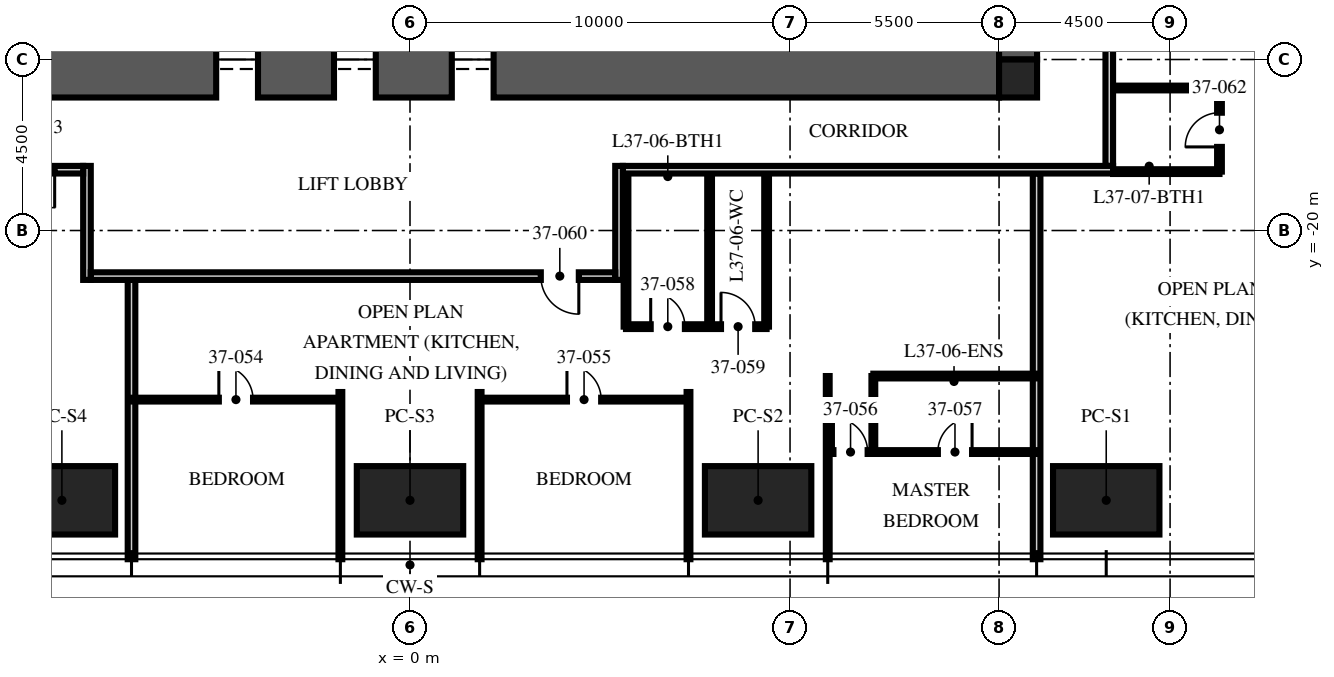
"""IFC4 building model, lengths in metres.
Left out: names, types, materials, properties, quantities, classifications, styles, units other than length and angle.
Written with IfcOpenShell. Run it as: python <this file> out.ifc"""

import sys

from ifc_helpers import new_model, si_unit, direction, frame, frame_2d, origin, origin_2d, place, context, subcontext, project, spatial, rectangle, extrude, element, fill, save


model = new_model("IFC4")
c1 = context("Model", 3, precision=1e-05, world=origin(), true_north=direction((0.0, 1.0)))
c2 = subcontext(c1, "Body", "Model", "MODEL_VIEW")
j1 = project(units=[si_unit("LENGTHUNIT", "METRE"), si_unit("PLANEANGLEUNIT", "RADIAN")], contexts=[c1])
p1 = place(None, origin())
s1 = spatial("IfcSite", under=j1, at=p1, CompositionType="ELEMENT")
p2 = place(p1, origin())
s2 = spatial("IfcBuilding", under=s1, at=p2, CompositionType="ELEMENT")
p3 = place(p2, frame((0.0, 0.0, 148.5)))
s3 = spatial("IfcBuildingStorey", under=s2, at=p3, CompositionType="ELEMENT", Elevation=148.5)
p4 = place(p3, frame((15.5, -15.5, -0.25), z_axis=(0.0, 0.0, 1.0), x_axis=(0.0, 1.0, 0.0)))
e1 = element("IfcWall", 1, at=p4, inside=s3, PredefinedType="SHEAR", context=c2, shape_type="SweptSolid", body=[
    extrude(rectangle(XDim=31.0, YDim=2.0, at=frame_2d((15.5, 0.0))), origin(), (0.0, 0.0, 1.0), 3.75),
])
p5 = place(p4, frame((6.5, 0.0, 0.25)))
e2 = element("IfcOpeningElement", 2, at=p5, cuts=e1, PredefinedType="OPENING", context=c2, shape_type="SweptSolid", body=[
    extrude(rectangle(XDim=1.2, YDim=2.1, at=frame_2d((0.6, 1.05))), frame((0.0, 1.01, 0.0), z_axis=(0.0, -1.0, 0.0), x_axis=(1.0, 0.0, 0.0)), (0.0, 0.0, 1.0), 2.02),
])
p6 = place(p4, frame((23.0, 0.0, 0.25)))
e3 = element("IfcOpeningElement", 3, at=p6, cuts=e1, PredefinedType="OPENING", context=c2, shape_type="SweptSolid", body=[
    extrude(rectangle(XDim=1.8, YDim=2.1, at=frame_2d((0.9, 1.05))), frame((0.0, 1.01, 0.0), z_axis=(0.0, -1.0, 0.0), x_axis=(1.0, 0.0, 0.0)), (0.0, 0.0, 1.0), 2.02),
])
p7 = place(p3, frame((-15.5, -15.5, -0.25), z_axis=(0.0, 0.0, 1.0), x_axis=(1.0, 0.0, 0.0)))
e4 = element("IfcWall", 4, at=p7, inside=s3, PredefinedType="SHEAR", context=c2, shape_type="SweptSolid", body=[
    extrude(rectangle(XDim=31.0, YDim=2.0, at=frame_2d((15.5, 0.0))), origin(), (0.0, 0.0, 1.0), 3.75),
])
p8 = place(p7, frame((10.4, 0.0, 0.25)))
e5 = element("IfcOpeningElement", 5, at=p8, cuts=e4, PredefinedType="OPENING", context=c2, shape_type="SweptSolid", body=[
    extrude(rectangle(XDim=1.1, YDim=2.1, at=frame_2d((0.55, 1.05))), frame((0.0, 1.01, 0.0), z_axis=(0.0, -1.0, 0.0), x_axis=(1.0, 0.0, 0.0)), (0.0, 0.0, 1.0), 2.02),
])
p9 = place(p7, frame((13.5, 0.0, 0.25)))
e6 = element("IfcOpeningElement", 6, at=p9, cuts=e4, PredefinedType="OPENING", context=c2, shape_type="SweptSolid", body=[
    extrude(rectangle(XDim=1.1, YDim=2.1, at=frame_2d((0.55, 1.05))), frame((0.0, 1.01, 0.0), z_axis=(0.0, -1.0, 0.0), x_axis=(1.0, 0.0, 0.0)), (0.0, 0.0, 1.0), 2.02),
])
p10 = place(p7, frame((16.6, 0.0, 0.25)))
e7 = element("IfcOpeningElement", 7, at=p10, cuts=e4, PredefinedType="OPENING", context=c2, shape_type="SweptSolid", body=[
    extrude(rectangle(XDim=1.1, YDim=2.1, at=frame_2d((0.55, 1.05))), frame((0.0, 1.01, 0.0), z_axis=(0.0, -1.0, 0.0), x_axis=(1.0, 0.0, 0.0)), (0.0, 0.0, 1.0), 2.02),
])
p11 = place(p3, frame((16.0, -16.0, -0.25), z_axis=(0.0, 0.0, 1.0), x_axis=(1.0, 0.0, 0.0)))
e8 = element("IfcColumn", 8, at=p11, inside=s3, PredefinedType="COLUMN", context=c2, shape_type="SweptSolid", body=[
    extrude(rectangle(XDim=1.0, YDim=1.0, at=origin_2d()), origin(), (0.0, 0.0, 1.0), 3.75),
])
for number, where, z_axis, x_axis in (
    (9, (18.32, -27.1, 0.0), (0.0, 0.0, 1.0), (1.0, 0.0, 0.0)),
    (10, (9.16, -27.1, 0.0), (0.0, 0.0, 1.0), (1.0, 0.0, 0.0)),
    (11, (0.0, -27.1, 0.0), (0.0, 0.0, 1.0), (1.0, 0.0, 0.0)),
    (12, (-9.16, -27.1, 0.0), (0.0, 0.0, 1.0), (1.0, 0.0, 0.0)),
):
    element("IfcColumn", number, at=place(p3, frame(where, z_axis=z_axis, x_axis=x_axis)), inside=s3, PredefinedType="COLUMN", context=c2, shape_type="SweptSolid", body=[
        extrude(rectangle(XDim=2.8, YDim=1.8, at=origin_2d()), origin(), (0.0, 0.0, 1.0), 3.75),
    ])
p12 = place(p3, frame((-7.328, -21.3, 0.0), z_axis=(0.0, 0.0, 1.0), x_axis=(0.0, -1.0, 0.0)))
e13 = element("IfcWall", 13, at=p12, inside=s3, PredefinedType="PARTITIONING", context=c2, shape_type="SweptSolid", body=[
    extrude(rectangle(XDim=7.35, YDim=0.2, at=frame_2d((3.675, 0.0))), origin(), (0.0, 0.0, 1.0), 2.81),
])
for number, where, z_axis, x_axis in (
    (14, (-1.832, -24.25, 0.0), (0.0, 0.0, 1.0), (0.0, -1.0, 0.0)),
    (15, (1.832, -24.25, 0.0), (0.0, 0.0, 1.0), (0.0, -1.0, 0.0)),
    (16, (7.328, -24.25, 0.0), (0.0, 0.0, 1.0), (0.0, -1.0, 0.0)),
):
    element("IfcWall", number, at=place(p3, frame(where, z_axis=z_axis, x_axis=x_axis)), inside=s3, PredefinedType="PARTITIONING", context=c2, shape_type="SweptSolid", body=[
        extrude(rectangle(XDim=4.4, YDim=0.1, at=frame_2d((2.2, 0.0))), origin(), (0.0, 0.0, 1.0), 2.81),
    ])
p13 = place(p3, frame((10.992, -23.83, 0.0), z_axis=(0.0, 0.0, 1.0), x_axis=(0.0, -1.0, 0.0)))
e17 = element("IfcWall", 17, at=p13, inside=s3, PredefinedType="PARTITIONING", context=c2, shape_type="SweptSolid", body=[
    extrude(rectangle(XDim=4.82, YDim=0.1, at=frame_2d((2.41, 0.0))), origin(), (0.0, 0.0, 1.0), 2.81),
])
p14 = place(p3, frame((16.488, -18.5, 0.0), z_axis=(0.0, 0.0, 1.0), x_axis=(0.0, -1.0, 0.0)))
e18 = element("IfcWall", 18, at=p14, inside=s3, PredefinedType="PARTITIONING", context=c2, shape_type="SweptSolid", body=[
    extrude(rectangle(XDim=10.15, YDim=0.2, at=frame_2d((5.075, 0.0))), origin(), (0.0, 0.0, 1.0), 2.81),
])
p15 = place(p3, frame((-7.328, -24.45, 0.0), z_axis=(0.0, 0.0, 1.0), x_axis=(1.0, 0.0, 0.0)))
e19 = element("IfcWall", 19, at=p15, inside=s3, PredefinedType="PARTITIONING", context=c2, shape_type="SweptSolid", body=[
    extrude(rectangle(XDim=5.496, YDim=0.1, at=frame_2d((2.748, 0.0))), origin(), (0.0, 0.0, 1.0), 2.81),
])
p16 = place(p15, frame((2.298, 0.0, 0.0)))
e20 = element("IfcOpeningElement", 20, at=p16, cuts=e19, PredefinedType="OPENING", context=c2, shape_type="SweptSolid", body=[
    extrude(rectangle(XDim=0.9, YDim=2.1, at=frame_2d((0.45, 1.05))), frame((0.0, 0.06, 0.0), z_axis=(0.0, -1.0, 0.0), x_axis=(1.0, 0.0, 0.0)), (0.0, 0.0, 1.0), 0.12),
])
p17 = place(p3, frame((1.832, -24.45, 0.0), z_axis=(0.0, 0.0, 1.0), x_axis=(1.0, 0.0, 0.0)))
e21 = element("IfcWall", 21, at=p17, inside=s3, PredefinedType="PARTITIONING", context=c2, shape_type="SweptSolid", body=[
    extrude(rectangle(XDim=5.496, YDim=0.1, at=frame_2d((2.748, 0.0))), origin(), (0.0, 0.0, 1.0), 2.81),
])
p18 = place(p17, frame((2.298, 0.0, 0.0)))
e22 = element("IfcOpeningElement", 22, at=p18, cuts=e21, PredefinedType="OPENING", context=c2, shape_type="SweptSolid", body=[
    extrude(rectangle(XDim=0.9, YDim=2.1, at=frame_2d((0.45, 1.05))), frame((0.0, 0.06, 0.0), z_axis=(0.0, -1.0, 0.0), x_axis=(1.0, 0.0, 0.0)), (0.0, 0.0, 1.0), 0.12),
])
p19 = place(p3, frame((10.992, -25.83, 0.0), z_axis=(0.0, 0.0, 1.0), x_axis=(1.0, 0.0, 0.0)))
e23 = element("IfcWall", 23, at=p19, inside=s3, PredefinedType="PARTITIONING", context=c2, shape_type="SweptSolid", body=[
    extrude(rectangle(XDim=5.496, YDim=0.1, at=frame_2d((2.748, 0.0))), origin(), (0.0, 0.0, 1.0), 2.81),
])
p20 = place(p19, frame((0.15, 0.0, 0.0)))
e24 = element("IfcOpeningElement", 24, at=p20, cuts=e23, PredefinedType="OPENING", context=c2, shape_type="SweptSolid", body=[
    extrude(rectangle(XDim=0.9, YDim=2.1, at=frame_2d((0.45, 1.05))), frame((0.0, 0.06, 0.0), z_axis=(0.0, -1.0, 0.0), x_axis=(1.0, 0.0, 0.0)), (0.0, 0.0, 1.0), 0.12),
])
p21 = place(p19, frame((2.898, 0.0, 0.0)))
e25 = element("IfcOpeningElement", 25, at=p21, cuts=e23, PredefinedType="OPENING", context=c2, shape_type="SweptSolid", body=[
    extrude(rectangle(XDim=0.9, YDim=2.1, at=frame_2d((0.45, 1.05))), frame((0.0, 0.06, 0.0), z_axis=(0.0, -1.0, 0.0), x_axis=(1.0, 0.0, 0.0)), (0.0, 0.0, 1.0), 0.12),
])
p22 = place(p3, frame((12.192, -23.83, 0.0), z_axis=(0.0, 0.0, 1.0), x_axis=(0.0, -1.0, 0.0)))
e26 = element("IfcWall", 26, at=p22, inside=s3, PredefinedType="PARTITIONING", context=c2, shape_type="SweptSolid", body=[
    extrude(rectangle(XDim=2.0, YDim=0.1, at=frame_2d((1.0, 0.0))), origin(), (0.0, 0.0, 1.0), 3.5),
])
p23 = place(p3, frame((12.192, -23.83, 0.0), z_axis=(0.0, 0.0, 1.0), x_axis=(1.0, 0.0, 0.0)))
e27 = element("IfcWall", 27, at=p23, inside=s3, PredefinedType="PARTITIONING", context=c2, shape_type="SweptSolid", body=[
    extrude(rectangle(XDim=4.296, YDim=0.125, at=frame_2d((2.148, 0.0))), origin(), (0.0, 0.0, 1.0), 2.81),
])
p24 = place(p3, frame((5.684, -22.53, 0.0), z_axis=(0.0, 0.0, 1.0), x_axis=(1.0, 0.0, 0.0)))
e28 = element("IfcWall", 28, at=p24, inside=s3, PredefinedType="PARTITIONING", context=c2, shape_type="SweptSolid", body=[
    extrude(rectangle(XDim=3.7, YDim=0.125, at=frame_2d((1.85, 0.0))), origin(), (0.0, 0.0, 1.0), 2.7),
])
p25 = place(p24, frame((0.65, 0.0, 0.0)))
e29 = element("IfcOpeningElement", 29, at=p25, cuts=e28, PredefinedType="OPENING", context=c2, shape_type="SweptSolid", body=[
    extrude(rectangle(XDim=0.9, YDim=2.1, at=frame_2d((0.45, 1.05))), frame((0.0, 0.073, 0.0), z_axis=(0.0, -1.0, 0.0), x_axis=(1.0, 0.0, 0.0)), (0.0, 0.0, 1.0), 0.145),
])
p26 = place(p24, frame((2.5, 0.0, 0.0)))
e30 = element("IfcOpeningElement", 30, at=p26, cuts=e28, PredefinedType="OPENING", context=c2, shape_type="SweptSolid", body=[
    extrude(rectangle(XDim=0.9, YDim=2.1, at=frame_2d((0.45, 1.05))), frame((0.0, 0.073, 0.0), z_axis=(0.0, -1.0, 0.0), x_axis=(1.0, 0.0, 0.0)), (0.0, 0.0, 1.0), 0.145),
])
for number, where, z_axis, x_axis in (
    (31, (5.684, -18.5, 0.0), (0.0, 0.0, 1.0), (0.0, -1.0, 0.0)),
    (32, (7.884, -18.5, 0.0), (0.0, 0.0, 1.0), (0.0, -1.0, 0.0)),
    (33, (9.384, -18.5, 0.0), (0.0, 0.0, 1.0), (0.0, -1.0, 0.0)),
):
    element("IfcWall", number, at=place(p3, frame(where, z_axis=z_axis, x_axis=x_axis)), inside=s3, PredefinedType="PARTITIONING", context=c2, shape_type="SweptSolid", body=[
        extrude(rectangle(XDim=4.03, YDim=0.125, at=frame_2d((2.015, 0.0))), origin(), (0.0, 0.0, 1.0), 3.5),
    ])
p27 = place(p3, frame((21.3, -18.45, 0.0), z_axis=(0.0, 0.0, 1.0), x_axis=(0.0, 1.0, 0.0)))
e34 = element("IfcWall", 34, at=p27, inside=s3, PredefinedType="PARTITIONING", context=c2, shape_type="SweptSolid", body=[
    extrude(rectangle(XDim=2.2, YDim=0.125, at=frame_2d((1.1, 0.0))), origin(), (0.0, 0.0, 1.0), 2.7),
])
p28 = place(p27, frame((0.65, 0.0, 0.0)))
e35 = element("IfcOpeningElement", 35, at=p28, cuts=e34, PredefinedType="OPENING", context=c2, shape_type="SweptSolid", body=[
    extrude(rectangle(XDim=0.9, YDim=2.1, at=frame_2d((0.45, 1.05))), frame((0.0, 0.073, 0.0), z_axis=(0.0, -1.0, 0.0), x_axis=(1.0, 0.0, 0.0)), (0.0, 0.0, 1.0), 0.145),
])
p29 = place(p3, frame((18.5, -18.45, 0.0), z_axis=(0.0, 0.0, 1.0), x_axis=(1.0, 0.0, 0.0)))
e36 = element("IfcWall", 36, at=p29, inside=s3, PredefinedType="PARTITIONING", context=c2, shape_type="SweptSolid", body=[
    extrude(rectangle(XDim=2.8, YDim=0.125, at=frame_2d((1.4, 0.0))), origin(), (0.0, 0.0, 1.0), 2.3),
])
p30 = place(p3, frame((18.5, -16.25, 0.0), z_axis=(0.0, 0.0, 1.0), x_axis=(1.0, 0.0, 0.0)))
e37 = element("IfcWall", 37, at=p30, inside=s3, PredefinedType="PARTITIONING", context=c2, shape_type="SweptSolid", body=[
    extrude(rectangle(XDim=2.8, YDim=0.125, at=frame_2d((1.4, 0.0))), origin(), (0.0, 0.0, 1.0), 3.5),
])
p31 = place(p3, frame((18.4, -18.3, 0.0), z_axis=(0.0, 0.0, 1.0), x_axis=(0.0, 1.0, 0.0)))
e38 = element("IfcWall", 38, at=p31, inside=s3, PredefinedType="PARTITIONING", context=c2, shape_type="SweptSolid", body=[
    extrude(rectangle(XDim=8.972, YDim=0.2, at=frame_2d((4.486, 0.0))), origin(), (0.0, 0.0, 1.0), 2.3),
])
p32 = place(p3, frame((18.5, -18.4, 0.0), z_axis=(0.0, 0.0, 1.0), x_axis=(-1.0, 0.0, 0.0)))
e39 = element("IfcWall", 39, at=p32, inside=s3, PredefinedType="PARTITIONING", context=c2, shape_type="SweptSolid", body=[
    extrude(rectangle(XDim=12.9, YDim=0.2, at=frame_2d((6.45, 0.0))), origin(), (0.0, 0.0, 1.0), 2.3),
])
for number, where, z_axis, x_axis in (
    (40, (5.5, -18.3, 0.0), (0.0, 0.0, 1.0), (0.0, -1.0, 0.0)),
    (41, (-8.5, -18.3, 0.0), (0.0, 0.0, 1.0), (0.0, -1.0, 0.0)),
):
    element("IfcWall", number, at=place(p3, frame(where, z_axis=z_axis, x_axis=x_axis)), inside=s3, PredefinedType="PARTITIONING", context=c2, shape_type="SweptSolid", body=[
        extrude(rectangle(XDim=3.0, YDim=0.2, at=frame_2d((1.5, 0.0))), origin(), (0.0, 0.0, 1.0), 3.5),
    ])
p33 = place(p3, frame((5.4, -21.2, 0.0), z_axis=(0.0, 0.0, 1.0), x_axis=(-1.0, 0.0, 0.0)))
e42 = element("IfcWall", 42, at=p33, inside=s3, PredefinedType="PARTITIONING", context=c2, shape_type="SweptSolid", body=[
    extrude(rectangle(XDim=13.8, YDim=0.2, at=frame_2d((6.9, 0.0))), origin(), (0.0, 0.0, 1.0), 2.7),
])
p34 = place(p33, frame((0.958, 0.0, 0.0)))
e43 = element("IfcOpeningElement", 43, at=p34, cuts=e42, PredefinedType="OPENING", context=c2, shape_type="SweptSolid", body=[
    extrude(rectangle(XDim=1.0, YDim=2.2, at=frame_2d((0.5, 1.1))), frame((0.0, 0.11, 0.0), z_axis=(0.0, -1.0, 0.0), x_axis=(1.0, 0.0, 0.0)), (0.0, 0.0, 1.0), 0.22),
])
p35 = place(p3, frame((-8.6, -18.4, 0.0), z_axis=(0.0, 0.0, 1.0), x_axis=(-1.0, 0.0, 0.0)))
e44 = element("IfcWall", 44, at=p35, inside=s3, PredefinedType="PARTITIONING", context=c2, shape_type="SweptSolid", body=[
    extrude(rectangle(XDim=9.9, YDim=0.2, at=frame_2d((4.95, 0.0))), origin(), (0.0, 0.0, 1.0), 2.3),
])
p36 = place(p35, frame((0.75, 0.0, 0.0)))
e45 = element("IfcOpeningElement", 45, at=p36, cuts=e44, PredefinedType="OPENING", context=c2, shape_type="SweptSolid", body=[
    extrude(rectangle(XDim=1.0, YDim=2.2, at=frame_2d((0.5, 1.1))), frame((0.0, 0.11, 0.0), z_axis=(0.0, -1.0, 0.0), x_axis=(1.0, 0.0, 0.0)), (0.0, 0.0, 1.0), 0.22),
])
p37 = place(p8, origin())
e46 = element("IfcDoor", 46, at=p37, inside=s3, OperationType="DOUBLE_DOOR_SLIDING", PredefinedType="DOOR", context=c2, shape_type="SweptSolid", body=[
    extrude(rectangle(XDim=1.1, YDim=2.1, at=frame_2d((0.55, 1.05))), frame((0.0, 0.025, 0.0), z_axis=(0.0, -1.0, 0.0), x_axis=(1.0, 0.0, 0.0)), (0.0, 0.0, 1.0), 0.05),
])
fill(e5, e46)
p38 = place(p9, origin())
e47 = element("IfcDoor", 47, at=p38, inside=s3, OperationType="DOUBLE_DOOR_SLIDING", PredefinedType="DOOR", context=c2, shape_type="SweptSolid", body=[
    extrude(rectangle(XDim=1.1, YDim=2.1, at=frame_2d((0.55, 1.05))), frame((0.0, 0.025, 0.0), z_axis=(0.0, -1.0, 0.0), x_axis=(1.0, 0.0, 0.0)), (0.0, 0.0, 1.0), 0.05),
])
fill(e6, e47)
p39 = place(p10, origin())
e48 = element("IfcDoor", 48, at=p39, inside=s3, OperationType="DOUBLE_DOOR_SLIDING", PredefinedType="DOOR", context=c2, shape_type="SweptSolid", body=[
    extrude(rectangle(XDim=1.1, YDim=2.1, at=frame_2d((0.55, 1.05))), frame((0.0, 0.025, 0.0), z_axis=(0.0, -1.0, 0.0), x_axis=(1.0, 0.0, 0.0)), (0.0, 0.0, 1.0), 0.05),
])
fill(e7, e48)
p40 = place(p36, origin())
e49 = element("IfcDoor", 49, at=p40, inside=s3, OperationType="SINGLE_SWING_LEFT", PredefinedType="DOOR", context=c2, shape_type="SweptSolid", body=[
    extrude(rectangle(XDim=1.0, YDim=2.2, at=frame_2d((0.5, 1.1))), frame((0.0, 0.025, 0.0), z_axis=(0.0, -1.0, 0.0), x_axis=(1.0, 0.0, 0.0)), (0.0, 0.0, 1.0), 0.05),
])
fill(e45, e49)
p41 = place(p16, origin())
e50 = element("IfcDoor", 50, at=p41, inside=s3, OperationType="SINGLE_SWING_LEFT", PredefinedType="DOOR", context=c2, shape_type="SweptSolid", body=[
    extrude(rectangle(XDim=0.9, YDim=2.1, at=frame_2d((0.45, 1.05))), frame((0.0, 0.025, 0.0), z_axis=(0.0, -1.0, 0.0), x_axis=(1.0, 0.0, 0.0)), (0.0, 0.0, 1.0), 0.05),
])
fill(e20, e50)
p42 = place(p18, origin())
e51 = element("IfcDoor", 51, at=p42, inside=s3, OperationType="SINGLE_SWING_LEFT", PredefinedType="DOOR", context=c2, shape_type="SweptSolid", body=[
    extrude(rectangle(XDim=0.9, YDim=2.1, at=frame_2d((0.45, 1.05))), frame((0.0, 0.025, 0.0), z_axis=(0.0, -1.0, 0.0), x_axis=(1.0, 0.0, 0.0)), (0.0, 0.0, 1.0), 0.05),
])
fill(e22, e51)
p43 = place(p20, origin())
e52 = element("IfcDoor", 52, at=p43, inside=s3, OperationType="SINGLE_SWING_LEFT", PredefinedType="DOOR", context=c2, shape_type="SweptSolid", body=[
    extrude(rectangle(XDim=0.9, YDim=2.1, at=frame_2d((0.45, 1.05))), frame((0.0, 0.025, 0.0), z_axis=(0.0, -1.0, 0.0), x_axis=(1.0, 0.0, 0.0)), (0.0, 0.0, 1.0), 0.05),
])
fill(e24, e52)
p44 = place(p21, origin())
e53 = element("IfcDoor", 53, at=p44, inside=s3, OperationType="SINGLE_SWING_RIGHT", PredefinedType="DOOR", context=c2, shape_type="SweptSolid", body=[
    extrude(rectangle(XDim=0.9, YDim=2.1, at=frame_2d((0.45, 1.05))), frame((0.0, 0.025, 0.0), z_axis=(0.0, -1.0, 0.0), x_axis=(1.0, 0.0, 0.0)), (0.0, 0.0, 1.0), 0.05),
])
fill(e25, e53)
p45 = place(p25, origin())
e54 = element("IfcDoor", 54, at=p45, inside=s3, OperationType="SINGLE_SWING_LEFT", PredefinedType="DOOR", context=c2, shape_type="SweptSolid", body=[
    extrude(rectangle(XDim=0.9, YDim=2.1, at=frame_2d((0.45, 1.05))), frame((0.0, 0.025, 0.0), z_axis=(0.0, -1.0, 0.0), x_axis=(1.0, 0.0, 0.0)), (0.0, 0.0, 1.0), 0.05),
])
fill(e29, e54)
p46 = place(p26, origin())
e55 = element("IfcDoor", 55, at=p46, inside=s3, OperationType="SINGLE_SWING_LEFT", PredefinedType="DOOR", context=c2, shape_type="SweptSolid", body=[
    extrude(rectangle(XDim=0.9, YDim=2.1, at=frame_2d((0.45, 1.05))), frame((0.0, 0.025, 0.0), z_axis=(0.0, -1.0, 0.0), x_axis=(1.0, 0.0, 0.0)), (0.0, 0.0, 1.0), 0.05),
])
fill(e30, e55)
p47 = place(p34, origin())
e56 = element("IfcDoor", 56, at=p47, inside=s3, OperationType="SINGLE_SWING_LEFT", PredefinedType="DOOR", context=c2, shape_type="SweptSolid", body=[
    extrude(rectangle(XDim=1.0, YDim=2.2, at=frame_2d((0.5, 1.1))), frame((0.0, 0.025, 0.0), z_axis=(0.0, -1.0, 0.0), x_axis=(1.0, 0.0, 0.0)), (0.0, 0.0, 1.0), 0.05),
])
fill(e43, e56)
p48 = place(p28, origin())
e57 = element("IfcDoor", 57, at=p48, inside=s3, OperationType="SINGLE_SWING_LEFT", PredefinedType="DOOR", context=c2, shape_type="SweptSolid", body=[
    extrude(rectangle(XDim=0.9, YDim=2.1, at=frame_2d((0.45, 1.05))), frame((0.0, 0.025, 0.0), z_axis=(0.0, -1.0, 0.0), x_axis=(1.0, 0.0, 0.0)), (0.0, 0.0, 1.0), 0.05),
])
fill(e35, e57)
save(model, sys.argv[1])
